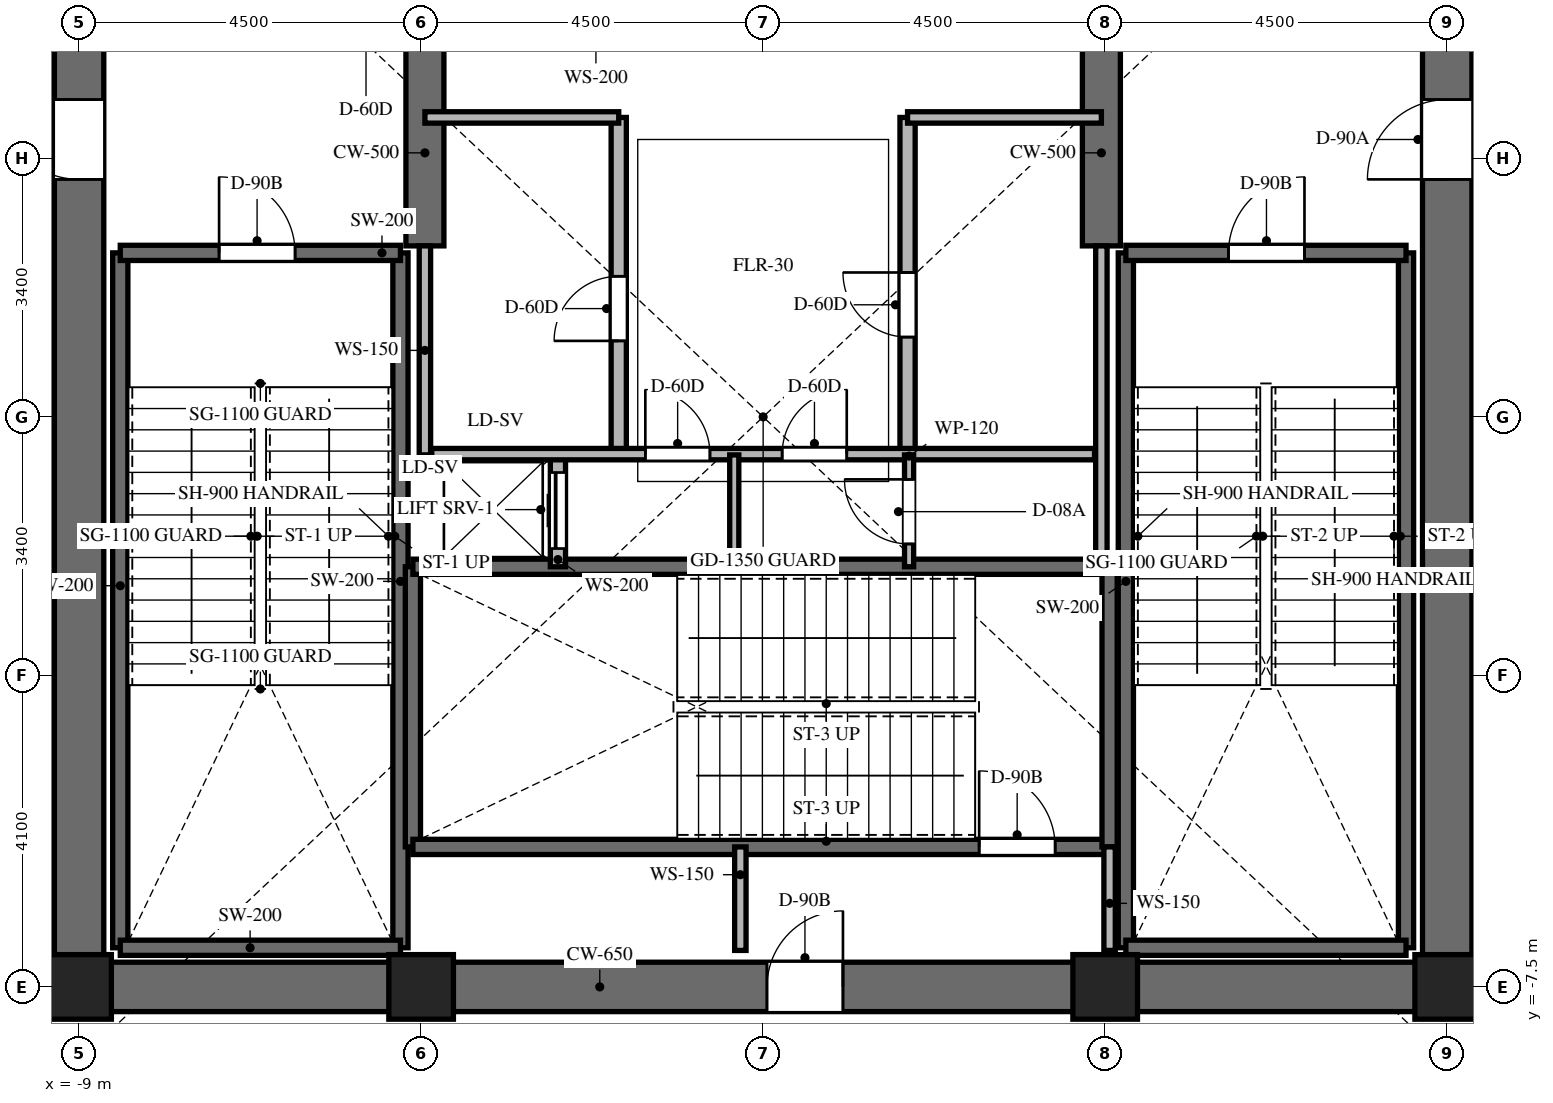
"""IFC4 building model, lengths in metres.
Left out: names, types, materials, properties, quantities, classifications, styles, units other than length and angle.
Written with IfcOpenShell. Run it as: python <this file> out.ifc"""

import sys

from ifc_helpers import new_model, si_unit, direction, frame, frame_2d, origin, origin_2d, place, context, subcontext, project, spatial, rectangle, extrude, element, fill, save


model = new_model("IFC4")
c1 = context("Model", 3, precision=1e-05, world=origin(), true_north=direction((0.0, 1.0)))
c2 = subcontext(c1, "Body", "Model", "MODEL_VIEW")
j1 = project(units=[si_unit("LENGTHUNIT", "METRE"), si_unit("PLANEANGLEUNIT", "RADIAN")], contexts=[c1])
p1 = place(None, origin())
s1 = spatial("IfcSite", under=j1, at=p1, CompositionType="ELEMENT")
p2 = place(p1, origin())
s2 = spatial("IfcBuilding", under=s1, at=p2, CompositionType="ELEMENT")
p3 = place(p2, frame((0.0, 0.0, 305.4)))
s3 = spatial("IfcBuildingStorey", under=s2, at=p3, CompositionType="ELEMENT", Elevation=305.4)
p4 = place(p3, frame((-9.325, -7.5, 0.0), z_axis=(0.0, 0.0, 1.0), x_axis=(1.0, 0.0, 0.0)))
e1 = element("IfcWall", 1, at=p4, inside=s3, PredefinedType="SHEAR", context=c2, shape_type="SweptSolid", body=[
    extrude(rectangle(XDim=18.65, YDim=0.65, at=frame_2d((9.325, 0.0))), origin(), (0.0, 0.0, 1.0), 5.0),
])
p5 = place(p4, frame((9.375, 0.0, 0.0)))
e2 = element("IfcOpeningElement", 2, at=p5, cuts=e1, PredefinedType="OPENING", context=c2, shape_type="SweptSolid", body=[
    extrude(rectangle(XDim=1.0, YDim=2.15, at=frame_2d((0.5, 1.075))), frame((0.0, 0.335, 0.0), z_axis=(0.0, -1.0, 0.0), x_axis=(1.0, 0.0, 0.0)), (0.0, 0.0, 1.0), 0.67),
])
p6 = place(p3, frame((-9.0, -7.175, 0.0), z_axis=(0.0, 0.0, 1.0), x_axis=(0.0, 1.0, 0.0)))
e3 = element("IfcWall", 3, at=p6, inside=s3, PredefinedType="SHEAR", context=c2, shape_type="SweptSolid", body=[
    extrude(rectangle(XDim=14.35, YDim=0.65, at=frame_2d((7.175, 0.0))), origin(), (0.0, 0.0, 1.0), 5.0),
])
p7 = place(p6, frame((10.3, 0.0, 0.0)))
e4 = element("IfcOpeningElement", 4, at=p7, cuts=e3, PredefinedType="OPENING", context=c2, shape_type="SweptSolid", body=[
    extrude(rectangle(XDim=1.05, YDim=2.15, at=frame_2d((0.525, 1.075))), frame((0.0, 0.335, 0.0), z_axis=(0.0, -1.0, 0.0), x_axis=(1.0, 0.0, 0.0)), (0.0, 0.0, 1.0), 0.67),
])
p8 = place(p3, frame((9.0, -7.175, 0.0), z_axis=(0.0, 0.0, 1.0), x_axis=(0.0, 1.0, 0.0)))
e5 = element("IfcWall", 5, at=p8, inside=s3, PredefinedType="SHEAR", context=c2, shape_type="SweptSolid", body=[
    extrude(rectangle(XDim=14.35, YDim=0.65, at=frame_2d((7.175, 0.0))), origin(), (0.0, 0.0, 1.0), 5.0),
])
p9 = place(p8, frame((10.3, 0.0, 0.0)))
e6 = element("IfcOpeningElement", 6, at=p9, cuts=e5, PredefinedType="OPENING", context=c2, shape_type="SweptSolid", body=[
    extrude(rectangle(XDim=1.05, YDim=2.15, at=frame_2d((0.525, 1.075))), frame((0.0, 0.335, 0.0), z_axis=(0.0, -1.0, 0.0), x_axis=(1.0, 0.0, 0.0)), (0.0, 0.0, 1.0), 0.67),
])
for number, where, z_axis, x_axis in (
    (7, (-4.45, 2.25, 0.0), (0.0, 0.0, 1.0), (0.0, 1.0, 0.0)),
    (8, (4.45, 2.25, 0.0), (0.0, 0.0, 1.0), (0.0, 1.0, 0.0)),
):
    element("IfcWall", number, at=place(p3, frame(where, z_axis=z_axis, x_axis=x_axis)), inside=s3, PredefinedType="SHEAR", context=c2, shape_type="SweptSolid", body=[
        extrude(rectangle(XDim=4.925, YDim=0.5, at=frame_2d((2.462, 0.0))), origin(), (0.0, 0.0, 1.0), 5.0),
    ])
for number, where, z_axis, x_axis in (
    (9, (-8.458, -6.985, 0.0), (0.0, 0.0, 1.0), (0.0, 1.0, 0.0)),
    (10, (-4.772, -6.985, 0.0), (0.0, 0.0, 1.0), (0.0, 1.0, 0.0)),
):
    element("IfcWall", number, at=place(p3, frame(where, z_axis=z_axis, x_axis=x_axis)), inside=s3, PredefinedType="SHEAR", context=c2, shape_type="SweptSolid", body=[
        extrude(rectangle(XDim=9.143, YDim=0.2, at=frame_2d((4.572, 0.0))), origin(), (0.0, 0.0, 1.0), 5.0),
    ])
p10 = place(p3, frame((-8.458, -6.985, 0.0), z_axis=(0.0, 0.0, 1.0), x_axis=(1.0, 0.0, 0.0)))
e11 = element("IfcWall", 11, at=p10, inside=s3, PredefinedType="SHEAR", context=c2, shape_type="SweptSolid", body=[
    extrude(rectangle(XDim=3.686, YDim=0.2, at=frame_2d((1.843, 0.0))), origin(), (0.0, 0.0, 1.0), 5.0),
])
p11 = place(p3, frame((-8.458, 2.158, 0.0), z_axis=(0.0, 0.0, 1.0), x_axis=(1.0, 0.0, 0.0)))
e12 = element("IfcWall", 12, at=p11, inside=s3, PredefinedType="SHEAR", context=c2, shape_type="SweptSolid", body=[
    extrude(rectangle(XDim=3.686, YDim=0.2, at=frame_2d((1.843, 0.0))), origin(), (0.0, 0.0, 1.0), 5.0),
])
p12 = place(p11, frame((1.3, 0.0, 0.0)))
e13 = element("IfcOpeningElement", 13, at=p12, cuts=e12, PredefinedType="OPENING", context=c2, shape_type="SweptSolid", body=[
    extrude(rectangle(XDim=1.0, YDim=2.15, at=frame_2d((0.5, 1.075))), frame((0.0, 0.11, 0.0), z_axis=(0.0, -1.0, 0.0), x_axis=(1.0, 0.0, 0.0)), (0.0, 0.0, 1.0), 0.22),
])
for number, where, z_axis, x_axis in (
    (14, (4.772, -6.985, 0.0), (0.0, 0.0, 1.0), (0.0, 1.0, 0.0)),
    (15, (8.458, -6.985, 0.0), (0.0, 0.0, 1.0), (0.0, 1.0, 0.0)),
):
    element("IfcWall", number, at=place(p3, frame(where, z_axis=z_axis, x_axis=x_axis)), inside=s3, PredefinedType="SHEAR", context=c2, shape_type="SweptSolid", body=[
        extrude(rectangle(XDim=9.143, YDim=0.2, at=frame_2d((4.572, 0.0))), origin(), (0.0, 0.0, 1.0), 5.0),
    ])
p13 = place(p3, frame((4.772, -6.985, 0.0), z_axis=(0.0, 0.0, 1.0), x_axis=(1.0, 0.0, 0.0)))
e16 = element("IfcWall", 16, at=p13, inside=s3, PredefinedType="SHEAR", context=c2, shape_type="SweptSolid", body=[
    extrude(rectangle(XDim=3.686, YDim=0.2, at=frame_2d((1.843, 0.0))), origin(), (0.0, 0.0, 1.0), 5.0),
])
p14 = place(p3, frame((4.772, 2.158, 0.0), z_axis=(0.0, 0.0, 1.0), x_axis=(1.0, 0.0, 0.0)))
e17 = element("IfcWall", 17, at=p14, inside=s3, PredefinedType="SHEAR", context=c2, shape_type="SweptSolid", body=[
    extrude(rectangle(XDim=3.686, YDim=0.2, at=frame_2d((1.843, 0.0))), origin(), (0.0, 0.0, 1.0), 5.0),
])
p15 = place(p14, frame((1.35, 0.0, 0.0)))
e18 = element("IfcOpeningElement", 18, at=p15, cuts=e17, PredefinedType="OPENING", context=c2, shape_type="SweptSolid", body=[
    extrude(rectangle(XDim=1.0, YDim=2.15, at=frame_2d((0.5, 1.075))), frame((0.0, 0.11, 0.0), z_axis=(0.0, -1.0, 0.0), x_axis=(1.0, 0.0, 0.0)), (0.0, 0.0, 1.0), 0.22),
])
p16 = place(p3, frame((-4.608, -5.658, 0.0), z_axis=(0.0, 0.0, 1.0), x_axis=(0.0, 1.0, 0.0)))
e19 = element("IfcWall", 19, at=p16, inside=s3, PredefinedType="SHEAR", context=c2, shape_type="SweptSolid", body=[
    extrude(rectangle(XDim=3.686, YDim=0.2, at=frame_2d((1.843, 0.0))), origin(), (0.0, 0.0, 1.0), 5.0),
])
p17 = place(p3, frame((-4.608, -5.658, 0.0), z_axis=(0.0, 0.0, 1.0), x_axis=(1.0, 0.0, 0.0)))
e20 = element("IfcWall", 20, at=p17, inside=s3, PredefinedType="SHEAR", context=c2, shape_type="SweptSolid", body=[
    extrude(rectangle(XDim=9.166, YDim=0.2, at=frame_2d((4.583, 0.0))), origin(), (0.0, 0.0, 1.0), 5.0),
])
p18 = place(p17, frame((7.45, 0.0, 0.0)))
e21 = element("IfcOpeningElement", 21, at=p18, cuts=e20, PredefinedType="OPENING", context=c2, shape_type="SweptSolid", body=[
    extrude(rectangle(XDim=1.0, YDim=2.15, at=frame_2d((0.5, 1.075))), frame((0.0, 0.11, 0.0), z_axis=(0.0, -1.0, 0.0), x_axis=(1.0, 0.0, 0.0)), (0.0, 0.0, 1.0), 0.22),
])
p19 = place(p3, frame((-4.608, -1.972, 0.0), z_axis=(0.0, 0.0, 1.0), x_axis=(1.0, 0.0, 0.0)))
e22 = element("IfcWall", 22, at=p19, inside=s3, PredefinedType="SHEAR", context=c2, shape_type="SweptSolid", body=[
    extrude(rectangle(XDim=9.166, YDim=0.2, at=frame_2d((4.583, 0.0))), origin(), (0.0, 0.0, 1.0), 5.0),
])
p20 = place(p3, frame((4.558, -5.658, 0.0), z_axis=(0.0, 0.0, 1.0), x_axis=(0.0, 1.0, 0.0)))
e23 = element("IfcWall", 23, at=p20, inside=s3, PredefinedType="SHEAR", context=c2, shape_type="SweptSolid", body=[
    extrude(rectangle(XDim=3.686, YDim=0.2, at=frame_2d((1.843, 0.0))), origin(), (0.0, 0.0, 1.0), 5.0),
])
for number, where, z_axis, x_axis in (
    (24, (-9.0, -7.5, 0.0), (0.0, 0.0, 1.0), (1.0, 0.0, 0.0)),
    (25, (-4.5, -7.5, 0.0), (0.0, 0.0, 1.0), (1.0, 0.0, 0.0)),
    (26, (4.5, -7.5, 0.0), (0.0, 0.0, 1.0), (1.0, 0.0, 0.0)),
    (27, (9.0, -7.5, 0.0), (0.0, 0.0, 1.0), (1.0, 0.0, 0.0)),
):
    element("IfcColumn", number, at=place(p3, frame(where, z_axis=z_axis, x_axis=x_axis)), inside=s3, PredefinedType="COLUMN", context=c2, shape_type="SweptSolid", body=[
        extrude(rectangle(XDim=0.85, YDim=0.85, at=origin_2d()), origin(), (0.0, 0.0, 1.0), 5.0),
    ])
for number, where, z_axis, x_axis in (
    (28, (-0.3, -7.02, 0.0), (0.0, 0.0, 1.0), (0.0, 1.0, 0.0)),
    (29, (4.558, -7.02, 0.0), (0.0, 0.0, 1.0), (0.0, 1.0, 0.0)),
):
    element("IfcWall", number, at=place(p3, frame(where, z_axis=z_axis, x_axis=x_axis)), inside=s3, PredefinedType="PARTITIONING", context=c2, shape_type="SweptSolid", body=[
        extrude(rectangle(XDim=1.362, YDim=0.15, at=frame_2d((0.681, 0.0))), origin(), (0.0, 0.0, 1.0), 4.68),
    ])
p21 = place(p3, frame((-2.7, -1.972, 0.0), z_axis=(0.0, 0.0, 1.0), x_axis=(0.0, 1.0, 0.0)))
e30 = element("IfcWall", 30, at=p21, inside=s3, PredefinedType="PARTITIONING", context=c2, shape_type="SweptSolid", body=[
    extrude(rectangle(XDim=1.472, YDim=0.2, at=frame_2d((0.736, 0.0))), origin(), (0.0, 0.0, 1.0), 4.68),
])
p22 = place(p21, frame((0.24, 0.0, 0.0)))
e31 = element("IfcOpeningElement", 31, at=p22, cuts=e30, PredefinedType="OPENING", context=c2, shape_type="SweptSolid", body=[
    extrude(rectangle(XDim=1.0, YDim=2.2, at=frame_2d((0.5, 1.1))), frame((0.0, 0.11, 0.0), z_axis=(0.0, -1.0, 0.0), x_axis=(1.0, 0.0, 0.0)), (0.0, 0.0, 1.0), 0.22),
])
p23 = place(p3, frame((-4.45, -0.5, 0.0), z_axis=(0.0, 0.0, 1.0), x_axis=(0.0, 1.0, 0.0)))
e32 = element("IfcWall", 32, at=p23, inside=s3, PredefinedType="PARTITIONING", context=c2, shape_type="SweptSolid", body=[
    extrude(rectangle(XDim=2.75, YDim=0.15, at=frame_2d((1.375, 0.0))), origin(), (0.0, 0.0, 1.0), 4.68),
])
p24 = place(p3, frame((4.45, -1.972, 0.0), z_axis=(0.0, 0.0, 1.0), x_axis=(0.0, 1.0, 0.0)))
e33 = element("IfcWall", 33, at=p24, inside=s3, PredefinedType="PARTITIONING", context=c2, shape_type="SweptSolid", body=[
    extrude(rectangle(XDim=4.222, YDim=0.15, at=frame_2d((2.111, 0.0))), origin(), (0.0, 0.0, 1.0), 4.68),
])
p25 = place(p3, frame((-1.9, -0.5, 0.0), z_axis=(0.0, 0.0, 1.0), x_axis=(0.0, 1.0, 0.0)))
e34 = element("IfcWall", 34, at=p25, inside=s3, PredefinedType="PARTITIONING", context=c2, shape_type="SweptSolid", body=[
    extrude(rectangle(XDim=4.44, YDim=0.2, at=frame_2d((2.22, 0.0))), origin(), (0.0, 0.0, 1.0), 4.68),
])
p26 = place(p25, frame((1.5, 0.0, 0.0)))
e35 = element("IfcOpeningElement", 35, at=p26, cuts=e34, PredefinedType="OPENING", context=c2, shape_type="SweptSolid", body=[
    extrude(rectangle(XDim=0.85, YDim=2.03, at=frame_2d((0.425, 1.015))), frame((0.0, 0.11, 0.0), z_axis=(0.0, -1.0, 0.0), x_axis=(1.0, 0.0, 0.0)), (0.0, 0.0, 1.0), 0.22),
])
p27 = place(p3, frame((-4.45, 3.94, 0.0), z_axis=(0.0, 0.0, 1.0), x_axis=(1.0, 0.0, 0.0)))
e36 = element("IfcWall", 36, at=p27, inside=s3, PredefinedType="PARTITIONING", context=c2, shape_type="SweptSolid", body=[
    extrude(rectangle(XDim=2.55, YDim=0.15, at=frame_2d((1.275, 0.0))), origin(), (0.0, 0.0, 1.0), 4.68),
])
p28 = place(p3, frame((1.9, -0.5, 0.0), z_axis=(0.0, 0.0, 1.0), x_axis=(0.0, 1.0, 0.0)))
e37 = element("IfcWall", 37, at=p28, inside=s3, PredefinedType="PARTITIONING", context=c2, shape_type="SweptSolid", body=[
    extrude(rectangle(XDim=4.44, YDim=0.2, at=frame_2d((2.22, 0.0))), origin(), (0.0, 0.0, 1.0), 4.68),
])
p29 = place(p28, frame((1.55, 0.0, 0.0)))
e38 = element("IfcOpeningElement", 38, at=p29, cuts=e37, PredefinedType="OPENING", context=c2, shape_type="SweptSolid", body=[
    extrude(rectangle(XDim=0.85, YDim=2.03, at=frame_2d((0.425, 1.015))), frame((0.0, 0.11, 0.0), z_axis=(0.0, -1.0, 0.0), x_axis=(1.0, 0.0, 0.0)), (0.0, 0.0, 1.0), 0.22),
])
p30 = place(p3, frame((1.9, 3.94, 0.0), z_axis=(0.0, 0.0, 1.0), x_axis=(1.0, 0.0, 0.0)))
e39 = element("IfcWall", 39, at=p30, inside=s3, PredefinedType="PARTITIONING", context=c2, shape_type="SweptSolid", body=[
    extrude(rectangle(XDim=2.55, YDim=0.15, at=frame_2d((1.275, 0.0))), origin(), (0.0, 0.0, 1.0), 4.68),
])
p31 = place(p3, frame((-4.36, -0.49, 0.0), z_axis=(0.0, 0.0, 1.0), x_axis=(1.0, 0.0, 0.0)))
e40 = element("IfcWall", 40, at=p31, inside=s3, PredefinedType="PARTITIONING", context=c2, shape_type="SweptSolid", body=[
    extrude(rectangle(XDim=8.72, YDim=0.15, at=frame_2d((4.36, 0.0))), origin(), (0.0, 0.0, 1.0), 4.68),
])
p32 = place(p31, frame((2.81, 0.0, 0.0)))
e41 = element("IfcOpeningElement", 41, at=p32, cuts=e40, PredefinedType="OPENING", context=c2, shape_type="SweptSolid", body=[
    extrude(rectangle(XDim=0.85, YDim=2.03, at=frame_2d((0.425, 1.015))), frame((0.0, 0.085, 0.0), z_axis=(0.0, -1.0, 0.0), x_axis=(1.0, 0.0, 0.0)), (0.0, 0.0, 1.0), 0.17),
])
p33 = place(p31, frame((4.61, 0.0, 0.0)))
e42 = element("IfcOpeningElement", 42, at=p33, cuts=e40, PredefinedType="OPENING", context=c2, shape_type="SweptSolid", body=[
    extrude(rectangle(XDim=0.85, YDim=2.03, at=frame_2d((0.425, 1.015))), frame((0.0, 0.085, 0.0), z_axis=(0.0, -1.0, 0.0), x_axis=(1.0, 0.0, 0.0)), (0.0, 0.0, 1.0), 0.17),
])
p34 = place(p3, frame((-0.38, -1.972, 0.0), z_axis=(0.0, 0.0, 1.0), x_axis=(0.0, 1.0, 0.0)))
e43 = element("IfcWall", 43, at=p34, inside=s3, PredefinedType="PARTITIONING", context=c2, shape_type="SweptSolid", body=[
    extrude(rectangle(XDim=1.472, YDim=0.12, at=frame_2d((0.736, 0.0))), origin(), (0.0, 0.0, 1.0), 4.68),
])
p35 = place(p3, frame((1.92, -1.972, 0.0), z_axis=(0.0, 0.0, 1.0), x_axis=(0.0, 1.0, 0.0)))
e44 = element("IfcWall", 44, at=p35, inside=s3, PredefinedType="PARTITIONING", context=c2, shape_type="SweptSolid", body=[
    extrude(rectangle(XDim=1.472, YDim=0.12, at=frame_2d((0.736, 0.0))), origin(), (0.0, 0.0, 1.0), 4.68),
])
p36 = place(p35, frame((0.3, 0.0, 0.0)))
e45 = element("IfcOpeningElement", 45, at=p36, cuts=e44, PredefinedType="OPENING", context=c2, shape_type="SweptSolid", body=[
    extrude(rectangle(XDim=0.85, YDim=2.03, at=frame_2d((0.425, 1.015))), frame((0.0, 0.07, 0.0), z_axis=(0.0, -1.0, 0.0), x_axis=(1.0, 0.0, 0.0)), (0.0, 0.0, 1.0), 0.14),
])
p37 = place(p12, origin())
e46 = element("IfcDoor", 46, at=p37, inside=s3, OperationType="SINGLE_SWING_LEFT", PredefinedType="DOOR", context=c2, shape_type="SweptSolid", body=[
    extrude(rectangle(XDim=1.0, YDim=2.15, at=frame_2d((0.5, 1.075))), frame((0.0, 0.025, 0.0), z_axis=(0.0, -1.0, 0.0), x_axis=(1.0, 0.0, 0.0)), (0.0, 0.0, 1.0), 0.05),
])
fill(e13, e46)
p38 = place(p15, origin())
e47 = element("IfcDoor", 47, at=p38, inside=s3, OperationType="SINGLE_SWING_RIGHT", PredefinedType="DOOR", context=c2, shape_type="SweptSolid", body=[
    extrude(rectangle(XDim=1.0, YDim=2.15, at=frame_2d((0.5, 1.075))), frame((0.0, 0.025, 0.0), z_axis=(0.0, -1.0, 0.0), x_axis=(1.0, 0.0, 0.0)), (0.0, 0.0, 1.0), 0.05),
])
fill(e18, e47)
p39 = place(p18, origin())
e48 = element("IfcDoor", 48, at=p39, inside=s3, OperationType="SINGLE_SWING_LEFT", PredefinedType="DOOR", context=c2, shape_type="SweptSolid", body=[
    extrude(rectangle(XDim=1.0, YDim=2.15, at=frame_2d((0.5, 1.075))), frame((0.0, 0.025, 0.0), z_axis=(0.0, -1.0, 0.0), x_axis=(1.0, 0.0, 0.0)), (0.0, 0.0, 1.0), 0.05),
])
fill(e21, e48)
p40 = place(p5, origin())
e49 = element("IfcDoor", 49, at=p40, inside=s3, OperationType="SINGLE_SWING_RIGHT", PredefinedType="DOOR", context=c2, shape_type="SweptSolid", body=[
    extrude(rectangle(XDim=1.0, YDim=2.15, at=frame_2d((0.5, 1.075))), frame((0.0, 0.025, 0.0), z_axis=(0.0, -1.0, 0.0), x_axis=(1.0, 0.0, 0.0)), (0.0, 0.0, 1.0), 0.05),
])
fill(e2, e49)
p41 = place(p7, origin())
e50 = element("IfcDoor", 50, at=p41, inside=s3, OperationType="SINGLE_SWING_RIGHT", PredefinedType="DOOR", context=c2, shape_type="SweptSolid", body=[
    extrude(rectangle(XDim=1.05, YDim=2.15, at=frame_2d((0.525, 1.075))), frame((0.0, 0.025, 0.0), z_axis=(0.0, -1.0, 0.0), x_axis=(1.0, 0.0, 0.0)), (0.0, 0.0, 1.0), 0.05),
])
fill(e4, e50)
p42 = place(p9, origin())
e51 = element("IfcDoor", 51, at=p42, inside=s3, OperationType="SINGLE_SWING_LEFT", PredefinedType="DOOR", context=c2, shape_type="SweptSolid", body=[
    extrude(rectangle(XDim=1.05, YDim=2.15, at=frame_2d((0.525, 1.075))), frame((0.0, 0.025, 0.0), z_axis=(0.0, -1.0, 0.0), x_axis=(1.0, 0.0, 0.0)), (0.0, 0.0, 1.0), 0.05),
])
fill(e6, e51)
p43 = place(p22, origin())
e52 = element("IfcDoor", 52, at=p43, inside=s3, OperationType="SLIDING_TO_LEFT", PredefinedType="DOOR", context=c2, shape_type="SweptSolid", body=[
    extrude(rectangle(XDim=1.0, YDim=2.2, at=frame_2d((0.5, 1.1))), frame((0.0, 0.025, 0.0), z_axis=(0.0, -1.0, 0.0), x_axis=(1.0, 0.0, 0.0)), (0.0, 0.0, 1.0), 0.05),
])
fill(e31, e52)
p44 = place(p26, origin())
e53 = element("IfcDoor", 53, at=p44, inside=s3, OperationType="SINGLE_SWING_LEFT", PredefinedType="DOOR", context=c2, shape_type="SweptSolid", body=[
    extrude(rectangle(XDim=0.85, YDim=2.03, at=frame_2d((0.425, 1.015))), frame((0.0, 0.025, 0.0), z_axis=(0.0, -1.0, 0.0), x_axis=(1.0, 0.0, 0.0)), (0.0, 0.0, 1.0), 0.05),
])
fill(e35, e53)
p45 = place(p29, origin())
e54 = element("IfcDoor", 54, at=p45, inside=s3, OperationType="SINGLE_SWING_RIGHT", PredefinedType="DOOR", context=c2, shape_type="SweptSolid", body=[
    extrude(rectangle(XDim=0.85, YDim=2.03, at=frame_2d((0.425, 1.015))), frame((0.0, 0.025, 0.0), z_axis=(0.0, -1.0, 0.0), x_axis=(1.0, 0.0, 0.0)), (0.0, 0.0, 1.0), 0.05),
])
fill(e38, e54)
p46 = place(p32, origin())
e55 = element("IfcDoor", 55, at=p46, inside=s3, OperationType="SINGLE_SWING_LEFT", PredefinedType="DOOR", context=c2, shape_type="SweptSolid", body=[
    extrude(rectangle(XDim=0.85, YDim=2.03, at=frame_2d((0.425, 1.015))), frame((0.0, 0.025, 0.0), z_axis=(0.0, -1.0, 0.0), x_axis=(1.0, 0.0, 0.0)), (0.0, 0.0, 1.0), 0.05),
])
fill(e41, e55)
p47 = place(p33, origin())
e56 = element("IfcDoor", 56, at=p47, inside=s3, OperationType="SINGLE_SWING_RIGHT", PredefinedType="DOOR", context=c2, shape_type="SweptSolid", body=[
    extrude(rectangle(XDim=0.85, YDim=2.03, at=frame_2d((0.425, 1.015))), frame((0.0, 0.025, 0.0), z_axis=(0.0, -1.0, 0.0), x_axis=(1.0, 0.0, 0.0)), (0.0, 0.0, 1.0), 0.05),
])
fill(e42, e56)
p48 = place(p36, origin())
e57 = element("IfcDoor", 57, at=p48, inside=s3, OperationType="SINGLE_SWING_RIGHT", PredefinedType="DOOR", context=c2, shape_type="SweptSolid", body=[
    extrude(rectangle(XDim=0.85, YDim=2.03, at=frame_2d((0.425, 1.015))), frame((0.0, 0.025, 0.0), z_axis=(0.0, -1.0, 0.0), x_axis=(1.0, 0.0, 0.0)), (0.0, 0.0, 1.0), 0.05),
])
fill(e45, e57)
save(model, sys.argv[1])
